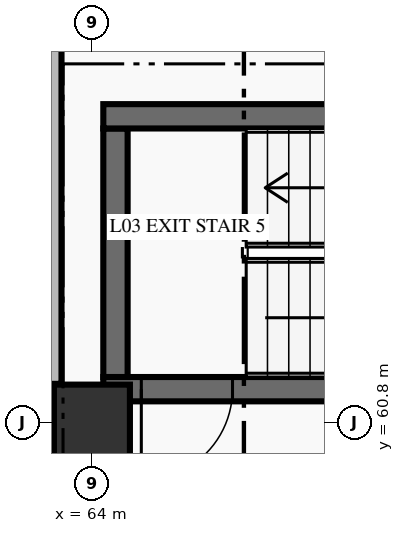
"""IFC4 building model, lengths in metres.
Left out: names, types, materials, properties, quantities, classifications, styles, units other than length and angle.
Written with IfcOpenShell. Run it as: python <this file> out.ifc"""

import sys

from ifc_helpers import new_model, si_unit, direction, frame, frame_2d, origin, origin_2d, place, context, subcontext, project, spatial, rectangle, extrude, element, fill, save


model = new_model("IFC4")
c1 = context("Model", 3, precision=1e-05, world=origin(), true_north=direction((0.0, 1.0)))
c2 = subcontext(c1, "Body", "Model", "MODEL_VIEW")
j1 = project(units=[si_unit("LENGTHUNIT", "METRE"), si_unit("PLANEANGLEUNIT", "RADIAN")], contexts=[c1])
p1 = place(None, origin())
s1 = spatial("IfcSite", under=j1, at=p1, CompositionType="ELEMENT")
p2 = place(p1, origin())
s2 = spatial("IfcBuilding", under=s1, at=p2, CompositionType="ELEMENT")
p3 = place(p2, frame((0.0, 0.0, 10.2)))
s3 = spatial("IfcBuildingStorey", under=s2, at=p3, CompositionType="ELEMENT", Elevation=10.2)
p4 = place(p3, frame((64.0, 60.8, 0.0), z_axis=(0.0, 0.0, 1.0), x_axis=(1.0, 0.0, 0.0)))
e1 = element("IfcColumn", 1, at=p4, inside=s3, PredefinedType="COLUMN", context=c2, shape_type="SweptSolid", body=[
    extrude(rectangle(XDim=1.0, YDim=1.0, at=origin_2d()), origin(), (0.0, 0.0, 1.0), 4.5),
])
p5 = place(p3, frame((71.85, 61.24, 0.0), z_axis=(0.0, 0.0, 1.0), x_axis=(-1.0, 0.0, 0.0)))
e2 = element("IfcWall", 2, at=p5, inside=s3, PredefinedType="SHEAR", context=c2, shape_type="SweptSolid", body=[
    extrude(rectangle(XDim=7.7, YDim=0.32, at=frame_2d((3.85, 0.0))), origin(), (0.0, 0.0, 1.0), 4.5),
])
p6 = place(p5, frame((6.0, 0.0, 0.0)))
e3 = element("IfcOpeningElement", 3, at=p6, cuts=e2, PredefinedType="OPENING", context=c2, shape_type="SweptSolid", body=[
    extrude(rectangle(XDim=1.2, YDim=2.2, at=frame_2d((0.6, 1.1))), frame((0.0, 0.17, 0.0), z_axis=(0.0, -1.0, 0.0), x_axis=(1.0, 0.0, 0.0)), (0.0, 0.0, 1.0), 0.34),
])
p7 = place(p3, frame((64.31, 61.4, 0.0), z_axis=(0.0, 0.0, 1.0), x_axis=(0.0, 1.0, 0.0)))
e4 = element("IfcWall", 4, at=p7, inside=s3, PredefinedType="SHEAR", context=c2, shape_type="SweptSolid", body=[
    extrude(rectangle(XDim=3.27, YDim=0.32, at=frame_2d((1.635, 0.0))), origin(), (0.0, 0.0, 1.0), 4.5),
])
p8 = place(p3, frame((64.15, 64.83, 0.0), z_axis=(0.0, 0.0, 1.0), x_axis=(1.0, 0.0, 0.0)))
e5 = element("IfcWall", 5, at=p8, inside=s3, PredefinedType="SHEAR", context=c2, shape_type="SweptSolid", body=[
    extrude(rectangle(XDim=7.7, YDim=0.32, at=frame_2d((3.85, 0.0))), origin(), (0.0, 0.0, 1.0), 4.5),
])
p9 = place(p3, frame((63.5, 61.31, 0.0), z_axis=(0.0, 0.0, 1.0), x_axis=(0.0, 1.0, 0.0)))
e6 = element("IfcWall", 6, at=p9, inside=s3, PredefinedType="STANDARD", context=c2, shape_type="SweptSolid", body=[
    extrude(rectangle(XDim=7.09, YDim=0.2, at=frame_2d((3.545, 0.0))), origin(), (0.0, 0.0, 1.0), 4.22),
])
p10 = place(p9, frame((5.02, 0.0, 0.0)))
e7 = element("IfcOpeningElement", 7, at=p10, cuts=e6, PredefinedType="OPENING", context=c2, shape_type="SweptSolid", body=[
    extrude(rectangle(XDim=1.05, YDim=2.15, at=frame_2d((0.525, 1.075))), frame((0.0, 0.11, 0.0), z_axis=(0.0, -1.0, 0.0), x_axis=(1.0, 0.0, 0.0)), (0.0, 0.0, 1.0), 0.22),
])
p11 = place(p6, origin())
e8 = element("IfcDoor", 8, at=p11, inside=s3, OperationType="SINGLE_SWING_RIGHT", PredefinedType="DOOR", context=c2, shape_type="SweptSolid", body=[
    extrude(rectangle(XDim=1.2, YDim=2.2, at=frame_2d((0.6, 1.1))), frame((0.0, 0.025, 0.0), z_axis=(0.0, -1.0, 0.0), x_axis=(1.0, 0.0, 0.0)), (0.0, 0.0, 1.0), 0.05),
])
fill(e3, e8)
save(model, sys.argv[1])
